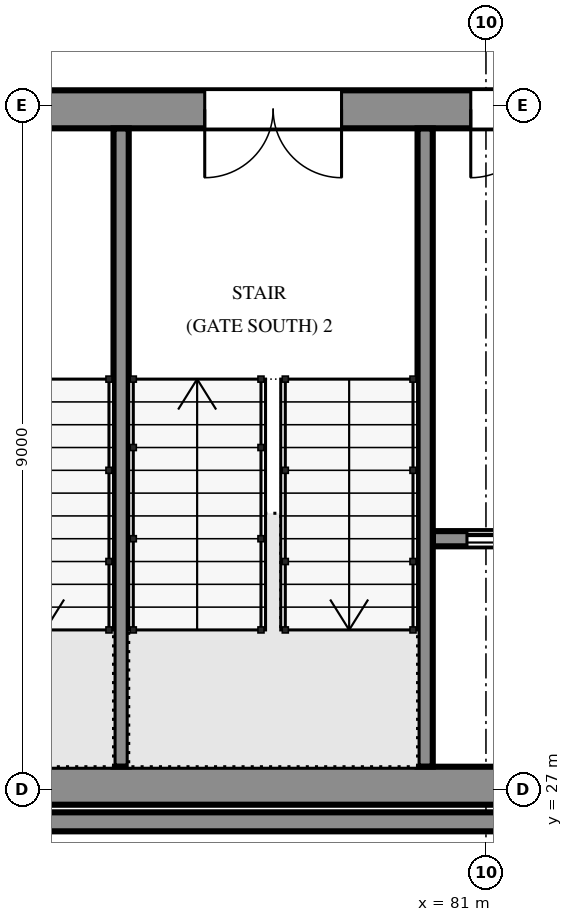
"""IFC4 building model, lengths in metres.
Left out: names, types, materials, properties, quantities, classifications, styles, units other than length and angle.
Written with IfcOpenShell. Run it as: python <this file> out.ifc"""

import sys

from ifc_helpers import new_model, si_unit, direction, frame, frame_2d, origin, place, context, subcontext, project, spatial, polyline, rectangle, outline, extrude, element, fill, save


model = new_model("IFC4")
c1 = context("Model", 3, precision=1e-05, world=origin(), true_north=direction((0.0, 1.0)))
c2 = subcontext(c1, "Body", "Model", "MODEL_VIEW")
j1 = project(units=[si_unit("LENGTHUNIT", "METRE"), si_unit("PLANEANGLEUNIT", "RADIAN")], contexts=[c1])
p1 = place(None, origin())
s1 = spatial("IfcSite", under=j1, at=p1, CompositionType="ELEMENT")
p2 = place(p1, origin())
s2 = spatial("IfcBuilding", under=s1, at=p2, CompositionType="ELEMENT")
p3 = place(p2, frame((0.0, 0.0, 11.7)))
s3 = spatial("IfcBuildingStorey", under=s2, at=p3, CompositionType="ELEMENT", Elevation=11.7)
p4 = place(p3, frame((71.8, 27.05, 0.0), z_axis=(0.0, 0.0, 1.0), x_axis=(1.0, 0.0, 0.0)))
e1 = element("IfcWall", 1, at=p4, inside=s3, PredefinedType="SOLIDWALL", context=c2, shape_type="SweptSolid", body=[
    extrude(rectangle(XDim=18.4, YDim=0.5, at=frame_2d((9.2, 0.0))), origin(), (0.0, 0.0, 1.0), 4.2),
])
p5 = place(p3, frame((71.8, 35.95, 0.0), z_axis=(0.0, 0.0, 1.0), x_axis=(1.0, 0.0, 0.0)))
e2 = element("IfcWall", 2, at=p5, inside=s3, PredefinedType="SOLIDWALL", context=c2, shape_type="SweptSolid", body=[
    extrude(rectangle(XDim=18.4, YDim=0.5, at=frame_2d((9.2, 0.0))), origin(), (0.0, 0.0, 1.0), 4.2),
])
p6 = place(p5, frame((1.5, 0.0, 0.0)))
e3 = element("IfcOpeningElement", 3, at=p6, cuts=e2, PredefinedType="OPENING", context=c2, shape_type="SweptSolid", body=[
    extrude(rectangle(XDim=1.8, YDim=2.1, at=frame_2d((0.9, 1.05))), frame((0.0, 0.26, 0.0), z_axis=(0.0, -1.0, 0.0), x_axis=(1.0, 0.0, 0.0)), (0.0, 0.0, 1.0), 0.52),
])
p7 = place(p5, frame((5.5, 0.0, 0.0)))
e4 = element("IfcOpeningElement", 4, at=p7, cuts=e2, PredefinedType="OPENING", context=c2, shape_type="SweptSolid", body=[
    extrude(rectangle(XDim=1.8, YDim=2.1, at=frame_2d((0.9, 1.05))), frame((0.0, 0.26, 0.0), z_axis=(0.0, -1.0, 0.0), x_axis=(1.0, 0.0, 0.0)), (0.0, 0.0, 1.0), 0.52),
])
p8 = place(p5, frame((9.0, 0.0, 0.0)))
e5 = element("IfcOpeningElement", 5, at=p8, cuts=e2, PredefinedType="OPENING", context=c2, shape_type="SweptSolid", body=[
    extrude(rectangle(XDim=1.8, YDim=2.1, at=frame_2d((0.9, 1.05))), frame((0.0, 0.26, 0.0), z_axis=(0.0, -1.0, 0.0), x_axis=(1.0, 0.0, 0.0)), (0.0, 0.0, 1.0), 0.52),
])
p9 = place(p5, frame((16.15, 0.0, 0.0)))
e6 = element("IfcOpeningElement", 6, at=p9, cuts=e2, PredefinedType="OPENING", context=c2, shape_type="SweptSolid", body=[
    extrude(rectangle(XDim=0.9, YDim=2.1, at=frame_2d((0.45, 1.05))), frame((0.0, 0.26, 0.0), z_axis=(0.0, -1.0, 0.0), x_axis=(1.0, 0.0, 0.0)), (0.0, 0.0, 1.0), 0.52),
])
p10 = place(p3, frame((71.45, 26.575, 0.0), z_axis=(0.0, 0.0, 1.0), x_axis=(1.0, 0.0, 0.0)))
e7 = element("IfcWall", 7, at=p10, inside=s3, PredefinedType="SOLIDWALL", context=c2, shape_type="SweptSolid", body=[
    extrude(outline(polyline([(0.0, 0.0), (19.1, 0.0), (19.1, 12.6), (0.0, 12.6), (0.0, 0.0)]), holes=[polyline([(1.308, 2.439), (1.352, 2.546), (1.408, 2.646), (1.475, 2.74), (1.552, 2.826), (1.638, 2.903), (1.732, 2.969), (1.833, 3.025), (1.939, 3.068), (2.05, 3.1), (2.161, 3.068), (2.267, 3.025), (2.368, 2.969), (2.462, 2.903), (2.549, 2.826), (2.625, 2.74), (2.692, 2.646), (2.748, 2.546), (2.792, 2.439), (2.824, 2.329), (2.844, 2.215), (2.85, 2.1), (2.85, 0.6), (1.25, 0.6), (1.25, 2.1), (1.257, 2.215), (1.276, 2.329), (1.308, 2.439)]), polyline([(4.308, 2.439), (4.352, 2.546), (4.408, 2.646), (4.475, 2.74), (4.552, 2.826), (4.638, 2.903), (4.732, 2.969), (4.833, 3.025), (4.939, 3.068), (5.05, 3.1), (5.161, 3.068), (5.267, 3.025), (5.368, 2.969), (5.462, 2.903), (5.549, 2.826), (5.625, 2.74), (5.692, 2.646), (5.748, 2.546), (5.792, 2.439), (5.824, 2.329), (5.844, 2.215), (5.85, 2.1), (5.85, 0.6), (4.25, 0.6), (4.25, 2.1), (4.257, 2.215), (4.276, 2.329), (4.308, 2.439)]), polyline([(7.308, 2.439), (7.352, 2.546), (7.408, 2.646), (7.475, 2.74), (7.552, 2.826), (7.638, 2.903), (7.732, 2.969), (7.833, 3.025), (7.939, 3.068), (8.05, 3.1), (8.161, 3.068), (8.267, 3.025), (8.368, 2.969), (8.462, 2.903), (8.549, 2.826), (8.625, 2.74), (8.692, 2.646), (8.748, 2.546), (8.792, 2.439), (8.824, 2.329), (8.844, 2.215), (8.85, 2.1), (8.85, 0.6), (7.25, 0.6), (7.25, 2.1), (7.257, 2.215), (7.276, 2.329), (7.308, 2.439)]), polyline([(1.308, 6.639), (1.352, 6.746), (1.408, 6.846), (1.475, 6.94), (1.552, 7.026), (1.638, 7.103), (1.732, 7.169), (1.833, 7.225), (1.939, 7.269), (2.05, 7.3), (2.161, 7.269), (2.267, 7.225), (2.368, 7.169), (2.462, 7.103), (2.549, 7.026), (2.625, 6.94), (2.692, 6.846), (2.748, 6.746), (2.792, 6.639), (2.824, 6.529), (2.844, 6.415), (2.85, 6.3), (2.85, 4.8), (1.25, 4.8), (1.25, 6.3), (1.257, 6.415), (1.276, 6.529), (1.308, 6.639)]), polyline([(4.308, 6.639), (4.352, 6.746), (4.408, 6.846), (4.475, 6.94), (4.552, 7.026), (4.638, 7.103), (4.732, 7.169), (4.833, 7.225), (4.939, 7.269), (5.05, 7.3), (5.161, 7.269), (5.267, 7.225), (5.368, 7.169), (5.462, 7.103), (5.549, 7.026), (5.625, 6.94), (5.692, 6.846), (5.748, 6.746), (5.792, 6.639), (5.824, 6.529), (5.844, 6.415), (5.85, 6.3), (5.85, 4.8), (4.25, 4.8), (4.25, 6.3), (4.257, 6.415), (4.276, 6.529), (4.308, 6.639)]), polyline([(7.308, 6.639), (7.352, 6.746), (7.408, 6.846), (7.475, 6.94), (7.552, 7.026), (7.638, 7.103), (7.732, 7.169), (7.833, 7.225), (7.939, 7.269), (8.05, 7.3), (8.161, 7.269), (8.267, 7.225), (8.368, 7.169), (8.462, 7.103), (8.549, 7.026), (8.625, 6.94), (8.692, 6.846), (8.748, 6.746), (8.792, 6.639), (8.824, 6.529), (8.844, 6.415), (8.85, 6.3), (8.85, 4.8), (7.25, 4.8), (7.25, 6.3), (7.257, 6.415), (7.276, 6.529), (7.308, 6.639)]), polyline([(1.308, 10.839), (1.352, 10.946), (1.408, 11.046), (1.475, 11.14), (1.552, 11.226), (1.638, 11.303), (1.732, 11.369), (1.833, 11.425), (1.939, 11.469), (2.05, 11.5), (2.161, 11.469), (2.267, 11.425), (2.368, 11.369), (2.462, 11.303), (2.549, 11.226), (2.625, 11.14), (2.692, 11.046), (2.748, 10.946), (2.792, 10.839), (2.824, 10.729), (2.844, 10.615), (2.85, 10.5), (2.85, 9.0), (1.25, 9.0), (1.25, 10.5), (1.257, 10.615), (1.276, 10.729), (1.308, 10.839)]), polyline([(4.352, 10.946), (4.408, 11.046), (4.475, 11.14), (4.552, 11.226), (4.638, 11.303), (4.732, 11.369), (4.833, 11.425), (4.939, 11.469), (5.05, 11.5), (5.161, 11.469), (5.267, 11.425), (5.368, 11.369), (5.462, 11.303), (5.549, 11.226), (5.625, 11.14), (5.692, 11.046), (5.748, 10.946), (5.792, 10.839), (5.824, 10.729), (5.844, 10.615), (5.85, 10.5), (5.85, 9.0), (4.25, 9.0), (4.25, 10.5), (4.257, 10.615), (4.276, 10.729), (4.308, 10.839), (4.352, 10.946)]), polyline([(7.352, 10.946), (7.408, 11.046), (7.475, 11.14), (7.552, 11.226), (7.638, 11.303), (7.732, 11.369), (7.833, 11.425), (7.939, 11.469), (8.05, 11.5), (8.161, 11.469), (8.267, 11.425), (8.368, 11.369), (8.462, 11.303), (8.549, 11.226), (8.625, 11.14), (8.692, 11.046), (8.748, 10.946), (8.792, 10.839), (8.824, 10.729), (8.844, 10.615), (8.85, 10.5), (8.85, 9.0), (7.25, 9.0), (7.25, 10.5), (7.257, 10.615), (7.276, 10.729), (7.308, 10.839), (7.352, 10.946)]), polyline([(10.308, 2.439), (10.352, 2.546), (10.408, 2.646), (10.475, 2.74), (10.552, 2.826), (10.638, 2.903), (10.732, 2.969), (10.833, 3.025), (10.939, 3.068), (11.05, 3.1), (11.161, 3.068), (11.267, 3.025), (11.368, 2.969), (11.462, 2.903), (11.549, 2.826), (11.625, 2.74), (11.692, 2.646), (11.748, 2.546), (11.792, 2.439), (11.824, 2.329), (11.844, 2.215), (11.85, 2.1), (11.85, 0.6), (10.25, 0.6), (10.25, 2.1), (10.257, 2.215), (10.276, 2.329), (10.308, 2.439)]), polyline([(13.308, 2.439), (13.352, 2.546), (13.408, 2.646), (13.475, 2.74), (13.552, 2.826), (13.638, 2.903), (13.732, 2.969), (13.833, 3.025), (13.939, 3.068), (14.05, 3.1), (14.161, 3.068), (14.267, 3.025), (14.368, 2.969), (14.462, 2.903), (14.549, 2.826), (14.625, 2.74), (14.692, 2.646), (14.748, 2.546), (14.792, 2.439), (14.824, 2.329), (14.844, 2.215), (14.85, 2.1), (14.85, 0.6), (13.25, 0.6), (13.25, 2.1), (13.257, 2.215), (13.276, 2.329), (13.308, 2.439)]), polyline([(16.308, 2.439), (16.352, 2.546), (16.408, 2.646), (16.475, 2.74), (16.552, 2.826), (16.638, 2.903), (16.732, 2.969), (16.833, 3.025), (16.939, 3.068), (17.05, 3.1), (17.161, 3.068), (17.267, 3.025), (17.368, 2.969), (17.462, 2.903), (17.549, 2.826), (17.625, 2.74), (17.692, 2.646), (17.748, 2.546), (17.792, 2.439), (17.824, 2.329), (17.844, 2.215), (17.85, 2.1), (17.85, 0.6), (16.25, 0.6), (16.25, 2.1), (16.257, 2.215), (16.276, 2.329), (16.308, 2.439)]), polyline([(10.308, 6.639), (10.352, 6.746), (10.408, 6.846), (10.475, 6.94), (10.552, 7.026), (10.638, 7.103), (10.732, 7.169), (10.833, 7.225), (10.939, 7.269), (11.05, 7.3), (11.161, 7.269), (11.267, 7.225), (11.368, 7.169), (11.462, 7.103), (11.549, 7.026), (11.625, 6.94), (11.692, 6.846), (11.748, 6.746), (11.792, 6.639), (11.824, 6.529), (11.844, 6.415), (11.85, 6.3), (11.85, 4.8), (10.25, 4.8), (10.25, 6.3), (10.257, 6.415), (10.276, 6.529), (10.308, 6.639)]), polyline([(13.308, 6.639), (13.352, 6.746), (13.408, 6.846), (13.475, 6.94), (13.552, 7.026), (13.638, 7.103), (13.732, 7.169), (13.833, 7.225), (13.939, 7.269), (14.05, 7.3), (14.161, 7.269), (14.267, 7.225), (14.368, 7.169), (14.462, 7.103), (14.549, 7.026), (14.625, 6.94), (14.692, 6.846), (14.748, 6.746), (14.792, 6.639), (14.824, 6.529), (14.844, 6.415), (14.85, 6.3), (14.85, 4.8), (13.25, 4.8), (13.25, 6.3), (13.257, 6.415), (13.276, 6.529), (13.308, 6.639)]), polyline([(16.308, 6.639), (16.352, 6.746), (16.408, 6.846), (16.475, 6.94), (16.552, 7.026), (16.638, 7.103), (16.732, 7.169), (16.833, 7.225), (16.939, 7.269), (17.05, 7.3), (17.161, 7.269), (17.267, 7.225), (17.368, 7.169), (17.462, 7.103), (17.549, 7.026), (17.625, 6.94), (17.692, 6.846), (17.748, 6.746), (17.792, 6.639), (17.824, 6.529), (17.844, 6.415), (17.85, 6.3), (17.85, 4.8), (16.25, 4.8), (16.25, 6.3), (16.257, 6.415), (16.276, 6.529), (16.308, 6.639)]), polyline([(10.308, 10.839), (10.352, 10.946), (10.408, 11.046), (10.475, 11.14), (10.552, 11.226), (10.638, 11.303), (10.732, 11.369), (10.833, 11.425), (10.939, 11.469), (11.05, 11.5), (11.161, 11.469), (11.267, 11.425), (11.368, 11.369), (11.462, 11.303), (11.549, 11.226), (11.625, 11.14), (11.692, 11.046), (11.748, 10.946), (11.792, 10.839), (11.824, 10.729), (11.844, 10.615), (11.85, 10.5), (11.85, 9.0), (10.25, 9.0), (10.25, 10.5), (10.257, 10.615), (10.276, 10.729), (10.308, 10.839)]), polyline([(13.352, 10.946), (13.408, 11.046), (13.475, 11.14), (13.552, 11.226), (13.638, 11.303), (13.732, 11.369), (13.833, 11.425), (13.939, 11.469), (14.05, 11.5), (14.161, 11.469), (14.267, 11.425), (14.368, 11.369), (14.462, 11.303), (14.549, 11.226), (14.625, 11.14), (14.692, 11.046), (14.748, 10.946), (14.792, 10.839), (14.824, 10.729), (14.844, 10.615), (14.85, 10.5), (14.85, 9.0), (13.25, 9.0), (13.25, 10.5), (13.257, 10.615), (13.276, 10.729), (13.308, 10.839), (13.352, 10.946)]), polyline([(16.352, 10.946), (16.408, 11.046), (16.475, 11.14), (16.552, 11.226), (16.638, 11.303), (16.732, 11.369), (16.833, 11.425), (16.939, 11.469), (17.05, 11.5), (17.161, 11.469), (17.267, 11.425), (17.368, 11.369), (17.462, 11.303), (17.549, 11.226), (17.625, 11.14), (17.692, 11.046), (17.748, 10.946), (17.792, 10.839), (17.824, 10.729), (17.844, 10.615), (17.85, 10.5), (17.85, 9.0), (16.25, 9.0), (16.25, 10.5), (16.257, 10.615), (16.276, 10.729), (16.308, 10.839), (16.352, 10.946)])]), frame((0.0, 0.125, 0.0), z_axis=(0.0, -1.0, 0.0), x_axis=(1.0, 0.0, 0.0)), (0.0, 0.0, 1.0), 0.25),
])
for number, where, z_axis, x_axis in (
    (8, (76.2, 27.302, -0.15), (0.0, 0.0, 1.0), (0.0, 1.0, 0.0)),
    (9, (80.2, 27.302, -0.15), (0.0, 0.0, 1.0), (0.0, 1.0, 0.0)),
):
    element("IfcWall", number, at=place(p3, frame(where, z_axis=z_axis, x_axis=x_axis)), inside=s3, PredefinedType="SOLIDWALL", context=c2, shape_type="SweptSolid", body=[
        extrude(rectangle(XDim=8.396, YDim=0.2, at=frame_2d((4.198, 0.0))), origin(), (0.0, 0.0, 1.0), 3.666),
    ])
p11 = place(p3, frame((80.302, 30.3, 0.0), z_axis=(0.0, 0.0, 1.0), x_axis=(1.0, 0.0, 0.0)))
e10 = element("IfcWall", 10, at=p11, inside=s3, PredefinedType="SOLIDWALL", context=c2, shape_type="SweptSolid", body=[
    extrude(rectangle(XDim=2.198, YDim=0.2, at=frame_2d((1.099, 0.0))), origin(), (0.0, 0.0, 1.0), 3.516),
])
p12 = place(p11, frame((0.448, 0.0, 0.0)))
e11 = element("IfcOpeningElement", 11, at=p12, cuts=e10, PredefinedType="OPENING", context=c2, shape_type="SweptSolid", body=[
    extrude(rectangle(XDim=1.1, YDim=2.1, at=frame_2d((0.55, 1.05))), frame((0.0, 0.11, 0.0), z_axis=(0.0, -1.0, 0.0), x_axis=(1.0, 0.0, 0.0)), (0.0, 0.0, 1.0), 0.22),
])
p13 = place(p12, origin())
e12 = element("IfcDoor", 12, at=p13, inside=s3, OperationType="SLIDING_TO_LEFT", PredefinedType="DOOR", context=c2, shape_type="SweptSolid", body=[
    extrude(outline(polyline([(0.0, 0.0), (0.07, 0.0), (0.07, 2.03), (1.03, 2.03), (1.03, 0.0), (1.1, 0.0), (1.1, 2.1), (0.0, 2.1), (0.0, 0.0)])), frame((0.0, 0.025, 0.0), z_axis=(0.0, -1.0, 0.0), x_axis=(1.0, 0.0, 0.0)), (0.0, 0.0, 1.0), 0.05),
    extrude(rectangle(XDim=0.524, YDim=2.016, at=frame_2d((0.336, 1.018))), frame((0.0, 0.018, 0.0), z_axis=(0.0, -1.0, 0.0), x_axis=(1.0, 0.0, 0.0)), (0.0, 0.0, 1.0), 0.016),
    extrude(rectangle(XDim=0.52, YDim=2.016, at=frame_2d((0.766, 1.018))), frame((0.0, -0.002, 0.0), z_axis=(0.0, -1.0, 0.0), x_axis=(1.0, 0.0, 0.0)), (0.0, 0.0, 1.0), 0.016),
])
fill(e11, e12)
p14 = place(p7, frame((1.8, 0.0, 0.0), z_axis=(0.0, 0.0, 1.0), x_axis=(-1.0, 0.0, 0.0)))
e13 = element("IfcDoor", 13, at=p14, inside=s3, OperationType="DOUBLE_DOOR_SINGLE_SWING", PredefinedType="DOOR", context=c2, shape_type="SweptSolid", body=[
    extrude(outline(polyline([(0.0, 0.0), (0.07, 0.0), (0.07, 2.03), (1.73, 2.03), (1.73, 0.0), (1.8, 0.0), (1.8, 2.1), (0.0, 2.1), (0.0, 0.0)])), frame((0.0, 0.025, 0.0), z_axis=(0.0, -1.0, 0.0), x_axis=(1.0, 0.0, 0.0)), (0.0, 0.0, 1.0), 0.05),
    extrude(outline(polyline([(0.074, 0.01), (0.897, 0.01), (0.897, 2.026), (0.074, 2.026), (0.074, 0.01)]), holes=[polyline([(0.194, 0.16), (0.777, 0.16), (0.777, 1.01), (0.194, 1.01), (0.194, 0.16)]), polyline([(0.335, 1.16), (0.635, 1.16), (0.635, 1.76), (0.335, 1.76), (0.335, 1.16)])]), frame((0.0, 0.017, 0.0), z_axis=(0.0, -1.0, 0.0), x_axis=(1.0, 0.0, 0.0)), (0.0, 0.0, 1.0), 0.035),
    extrude(rectangle(XDim=0.583, YDim=0.85, at=frame_2d((0.485, 0.585))), frame((0.0, 0.009, 0.0), z_axis=(0.0, -1.0, 0.0), x_axis=(1.0, 0.0, 0.0)), (0.0, 0.0, 1.0), 0.017),
    extrude(rectangle(XDim=0.3, YDim=0.6, at=frame_2d((0.485, 1.46))), frame((0.0, 0.006, 0.0), z_axis=(0.0, -1.0, 0.0), x_axis=(1.0, 0.0, 0.0)), (0.0, 0.0, 1.0), 0.012),
    extrude(outline(polyline([(0.903, 0.01), (1.726, 0.01), (1.726, 2.026), (0.903, 2.026), (0.903, 0.01)]), holes=[polyline([(1.023, 0.16), (1.606, 0.16), (1.606, 1.01), (1.023, 1.01), (1.023, 0.16)]), polyline([(1.165, 1.16), (1.465, 1.16), (1.465, 1.76), (1.165, 1.76), (1.165, 1.16)])]), frame((0.0, 0.017, 0.0), z_axis=(0.0, -1.0, 0.0), x_axis=(1.0, 0.0, 0.0)), (0.0, 0.0, 1.0), 0.035),
    extrude(rectangle(XDim=0.583, YDim=0.85, at=frame_2d((1.314, 0.585))), frame((0.0, 0.009, 0.0), z_axis=(0.0, -1.0, 0.0), x_axis=(1.0, 0.0, 0.0)), (0.0, 0.0, 1.0), 0.017),
    extrude(rectangle(XDim=0.3, YDim=0.6, at=frame_2d((1.314, 1.46))), frame((0.0, 0.006, 0.0), z_axis=(0.0, -1.0, 0.0), x_axis=(1.0, 0.0, 0.0)), (0.0, 0.0, 1.0), 0.012),
])
fill(e4, e13)
p15 = place(p8, frame((1.8, 0.0, 0.0), z_axis=(0.0, 0.0, 1.0), x_axis=(-1.0, 0.0, 0.0)))
e14 = element("IfcDoor", 14, at=p15, inside=s3, OperationType="DOUBLE_DOOR_SINGLE_SWING", PredefinedType="DOOR", context=c2, shape_type="SweptSolid", body=[
    extrude(outline(polyline([(0.0, 0.0), (0.07, 0.0), (0.07, 2.03), (1.73, 2.03), (1.73, 0.0), (1.8, 0.0), (1.8, 2.1), (0.0, 2.1), (0.0, 0.0)])), frame((0.0, 0.025, 0.0), z_axis=(0.0, -1.0, 0.0), x_axis=(1.0, 0.0, 0.0)), (0.0, 0.0, 1.0), 0.05),
    extrude(outline(polyline([(0.074, 0.01), (0.897, 0.01), (0.897, 2.026), (0.074, 2.026), (0.074, 0.01)]), holes=[polyline([(0.194, 0.16), (0.777, 0.16), (0.777, 1.01), (0.194, 1.01), (0.194, 0.16)]), polyline([(0.335, 1.16), (0.635, 1.16), (0.635, 1.76), (0.335, 1.76), (0.335, 1.16)])]), frame((0.0, 0.017, 0.0), z_axis=(0.0, -1.0, 0.0), x_axis=(1.0, 0.0, 0.0)), (0.0, 0.0, 1.0), 0.035),
    extrude(rectangle(XDim=0.583, YDim=0.85, at=frame_2d((0.485, 0.585))), frame((0.0, 0.009, 0.0), z_axis=(0.0, -1.0, 0.0), x_axis=(1.0, 0.0, 0.0)), (0.0, 0.0, 1.0), 0.017),
    extrude(rectangle(XDim=0.3, YDim=0.6, at=frame_2d((0.485, 1.46))), frame((0.0, 0.006, 0.0), z_axis=(0.0, -1.0, 0.0), x_axis=(1.0, 0.0, 0.0)), (0.0, 0.0, 1.0), 0.012),
    extrude(outline(polyline([(0.903, 0.01), (1.726, 0.01), (1.726, 2.026), (0.903, 2.026), (0.903, 0.01)]), holes=[polyline([(1.023, 0.16), (1.606, 0.16), (1.606, 1.01), (1.023, 1.01), (1.023, 0.16)]), polyline([(1.165, 1.16), (1.465, 1.16), (1.465, 1.76), (1.165, 1.76), (1.165, 1.16)])]), frame((0.0, 0.017, 0.0), z_axis=(0.0, -1.0, 0.0), x_axis=(1.0, 0.0, 0.0)), (0.0, 0.0, 1.0), 0.035),
    extrude(rectangle(XDim=0.583, YDim=0.85, at=frame_2d((1.314, 0.585))), frame((0.0, 0.009, 0.0), z_axis=(0.0, -1.0, 0.0), x_axis=(1.0, 0.0, 0.0)), (0.0, 0.0, 1.0), 0.017),
    extrude(rectangle(XDim=0.3, YDim=0.6, at=frame_2d((1.314, 1.46))), frame((0.0, 0.006, 0.0), z_axis=(0.0, -1.0, 0.0), x_axis=(1.0, 0.0, 0.0)), (0.0, 0.0, 1.0), 0.012),
])
fill(e5, e14)
save(model, sys.argv[1])
